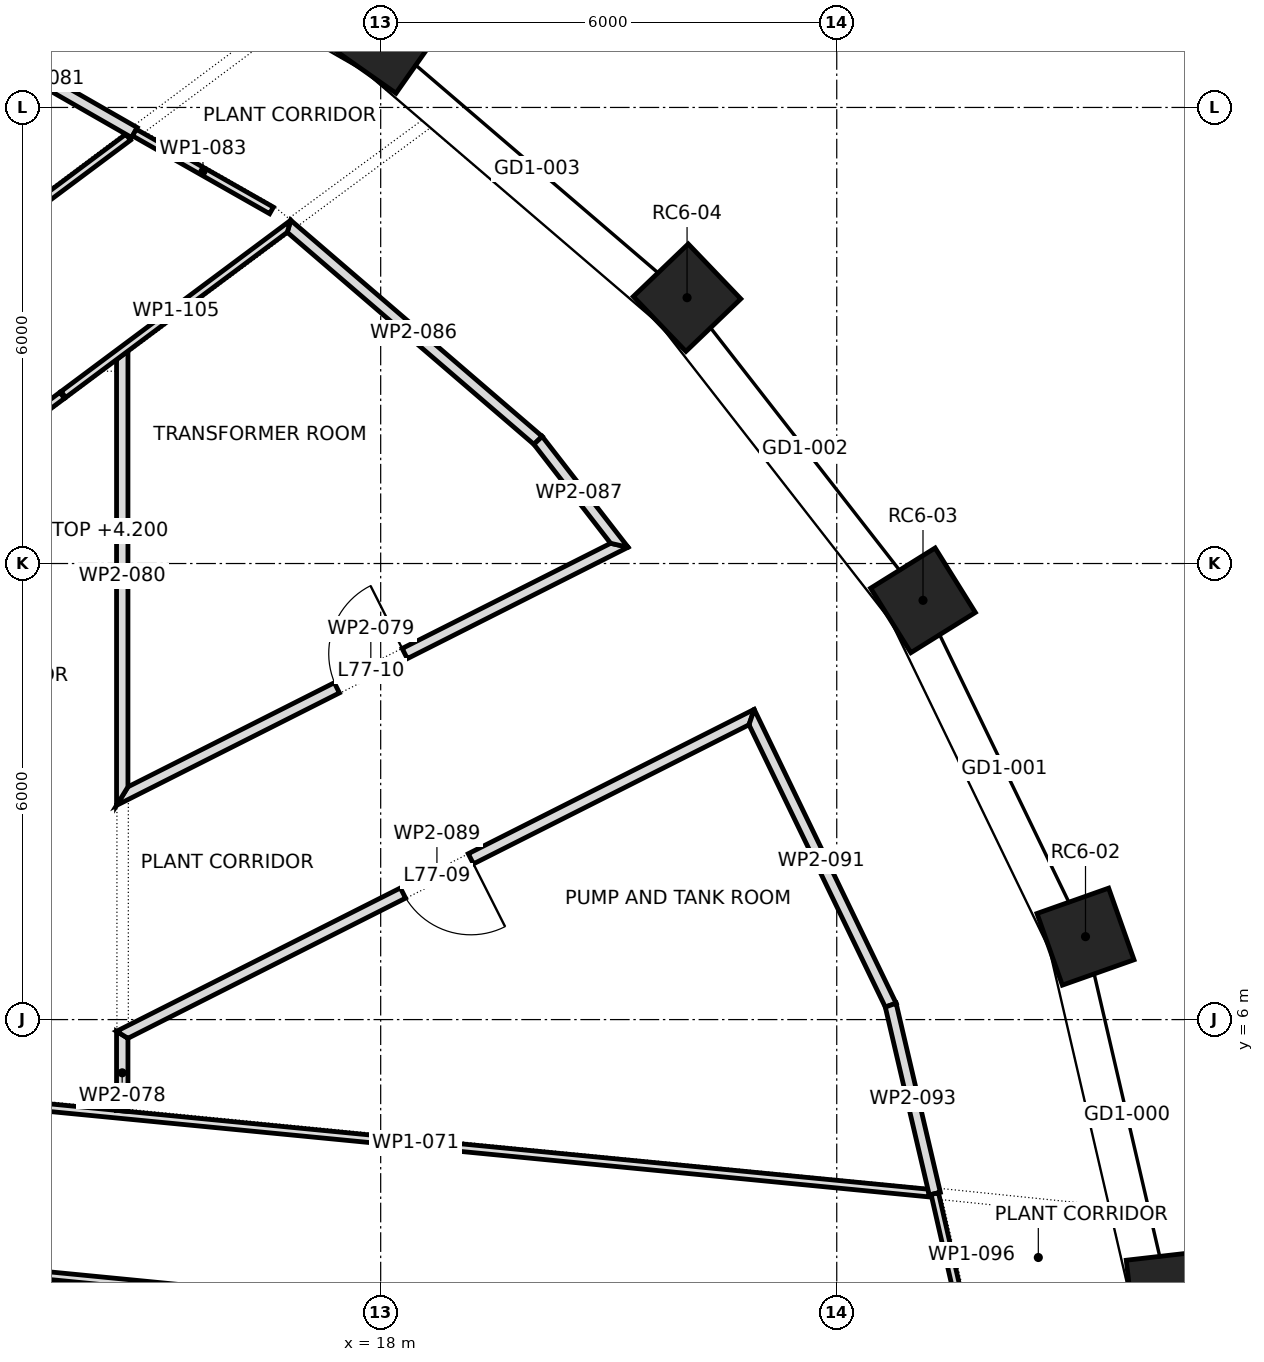
"""IFC4 building model, lengths in metres.
Left out: names, types, materials, properties, quantities, classifications, styles, units other than length and angle.
Written with IfcOpenShell. Run it as: python <this file> out.ifc"""

import sys

from ifc_helpers import new_model, si_unit, direction, frame, frame_2d, origin, origin_2d, place, context, subcontext, project, spatial, polyline, rectangle, outline, extrude, element, fill, save


model = new_model("IFC4")
c1 = context("Model", 3, precision=1e-05, world=origin(), true_north=direction((0.0, 1.0)))
c2 = subcontext(c1, "Body", "Model", "MODEL_VIEW")
j1 = project(units=[si_unit("LENGTHUNIT", "METRE"), si_unit("PLANEANGLEUNIT", "RADIAN")], contexts=[c1])
p1 = place(None, origin())
s1 = spatial("IfcSite", under=j1, at=p1, CompositionType="ELEMENT")
p2 = place(p1, origin())
s2 = spatial("IfcBuilding", under=s1, at=p2, CompositionType="ELEMENT")
p3 = place(p2, frame((0.0, 0.0, 328.3)))
s3 = spatial("IfcBuildingStorey", under=s2, at=p3, CompositionType="ELEMENT", Elevation=328.3)
for number, where, z_axis, x_axis in (
    (1, (28.363, 2.394, 0.0), (0.0, 0.0, 1.0), (-0.114, 0.993, 0.0)),
    (2, (27.273, 7.091, 0.0), (0.0, 0.0, 1.0), (-0.334, 0.943, 0.0)),
    (3, (25.135, 11.516, 0.0), (0.0, 0.0, 1.0), (-0.529, 0.849, 0.0)),
    (4, (22.031, 15.497, 0.0), (0.0, 0.0, 1.0), (-0.692, 0.722, 0.0)),
    (5, (18.08, 18.884, 0.0), (0.0, 0.0, 1.0), (-0.818, 0.575, 0.0)),
):
    element("IfcColumn", number, at=place(p3, frame(where, z_axis=z_axis, x_axis=x_axis)), inside=s3, PredefinedType="COLUMN", context=c2, shape_type="SweptSolid", body=[
        extrude(rectangle(XDim=1.0, YDim=1.0, at=origin_2d()), origin(), (0.0, 0.0, 1.0), 5.0),
    ])
p4 = place(p3, frame((7.82, 12.49, 0.0), z_axis=(0.0, 0.0, 1.0), x_axis=(0.801408213351, 0.598117777343, 0.0)))
e6 = element("IfcWall", 6, at=p4, inside=s3, PredefinedType="PARTITIONING", context=c2, shape_type="SweptSolid", body=[
    extrude(outline(polyline([(0.0, 0.05), (0.0, 0.05), (0.101, -0.05), (1.792, -0.05), (3.483, -0.05), (5.175, -0.05), (6.866, -0.05), (8.558, -0.05), (8.558, 0.05), (6.846, 0.05), (5.135, 0.05), (3.423, 0.05), (1.712, 0.05), (0.0, 0.05)])), origin(), (0.0, 0.0, 1.0), 4.65),
])
p5 = place(p3, frame((11.7, 2.82, 0.0), z_axis=(0.0, 0.0, 1.0), x_axis=(0.995286657009, -0.096976648632, 0.0)))
e7 = element("IfcWall", 7, at=p5, inside=s3, PredefinedType="PARTITIONING", context=c2, shape_type="SweptSolid", body=[
    extrude(outline(polyline([(0.0, -0.05), (1.497, -0.05), (2.993, -0.05), (2.994, -0.05), (2.994, -0.05), (4.518, -0.05), (6.041, -0.05), (7.565, -0.05), (9.088, -0.05), (9.088, 0.05), (7.271, 0.05), (5.453, 0.05), (3.635, 0.05), (1.818, 0.05), (0.0, 0.05), (0.0, -0.05)])), origin(), (0.0, 0.0, 1.0), 4.65),
])
p6 = place(p3, frame((11.7, 5.03, 0.0), z_axis=(0.0, 0.0, 1.0), x_axis=(0.995314737099, -0.096688024663, 0.0)))
e8 = element("IfcWall", 8, at=p6, inside=s3, PredefinedType="PARTITIONING", context=c2, shape_type="SweptSolid", body=[
    extrude(outline(polyline([(13.617, -0.05), (13.617, -0.048), (13.607, -0.016), (13.583, -0.024), (13.558, 0.05), (11.772, 0.05), (9.986, 0.05), (8.2, 0.05), (6.414, 0.05), (4.628, 0.05), (2.843, 0.05), (2.833, 0.049), (2.833, 0.05), (1.417, 0.05), (0.0, 0.05), (0.0, -0.05), (1.945, -0.05), (3.891, -0.05), (5.836, -0.05), (7.781, -0.05), (9.727, -0.05), (11.672, -0.05), (13.617, -0.05)])), origin(), (0.0, 0.0, 1.0), 4.65),
])
p7 = place(p3, frame((14.6, 5.846, 0.0), z_axis=(0.0, 0.0, 1.0), x_axis=(0.0, -1.0, 0.0)))
e9 = element("IfcWall", 9, at=p7, inside=s3, PredefinedType="PARTITIONING", context=c2, shape_type="SweptSolid", body=[
    extrude(outline(polyline([(0.0, -0.075), (1.04, -0.075), (1.055, 0.072), (1.055, 0.075), (0.092, 0.075), (0.092, 0.075), (0.092, 0.075), (0.046, 0.0), (0.0, -0.075)])), origin(), (0.0, 0.0, 1.0), 4.65),
])
p8 = place(p3, frame((14.491, 8.885, 0.0), z_axis=(0.0, 0.0, 1.0), x_axis=(0.892775886328, 0.450501073018, 0.0)))
e10 = element("IfcWall", 10, at=p8, inside=s3, PredefinedType="PARTITIONING", context=c2, shape_type="SweptSolid", body=[
    extrude(outline(polyline([(0.0, -0.075), (1.885, -0.075), (3.769, -0.075), (5.654, -0.075), (7.538, -0.075), (7.356, 0.075), (5.578, 0.075), (3.8, 0.075), (2.022, 0.075), (0.244, 0.075), (0.0, -0.075), (0.0, -0.075)])), origin(), (0.0, 0.0, 1.0), 4.65),
])
p9 = place(p8, frame((3.285, 0.0, 0.0)))
e11 = element("IfcOpeningElement", 11, at=p9, cuts=e10, PredefinedType="OPENING", context=c2, shape_type="SweptSolid", body=[
    extrude(rectangle(XDim=1.0, YDim=2.1, at=frame_2d((0.5, 1.05))), frame((0.0, 0.087, 0.0), z_axis=(0.0, -1.0, 0.0), x_axis=(1.0, 0.0, 0.0)), (0.0, 0.0, 1.0), 0.174),
])
p10 = place(p3, frame((14.6, 14.794, 0.0), z_axis=(0.0, 0.0, 1.0), x_axis=(0.0, -1.0, 0.0)))
e12 = element("IfcWall", 12, at=p10, inside=s3, PredefinedType="PARTITIONING", context=c2, shape_type="SweptSolid", body=[
    extrude(outline(polyline([(0.111, -0.075), (2.066, -0.075), (4.021, -0.075), (5.976, -0.075), (5.854, 0.0), (5.732, 0.075), (5.732, 0.075), (5.732, 0.075), (3.822, 0.075), (1.911, 0.075), (0.0, 0.075), (0.0, 0.074), (0.111, -0.075)])), origin(), (0.0, 0.0, 1.0), 4.65),
])
p11 = place(p3, frame((14.76, 17.67, 0.0), z_axis=(0.0, 0.0, 1.0), x_axis=(-0.867555136947, 0.497341014151, 0.0)))
e13 = element("IfcWall", 13, at=p11, inside=s3, PredefinedType="PARTITIONING", context=c2, shape_type="SweptSolid", body=[
    extrude(outline(polyline([(0.0, -0.075), (1.421, -0.075), (2.842, -0.075), (2.829, 0.075), (1.414, 0.075), (0.0, 0.075), (0.0, -0.075)])), origin(), (0.0, 0.0, 1.0), 4.65),
])
p12 = place(p3, frame((16.563, 16.645, 0.0), z_axis=(0.0, 0.0, 1.0), x_axis=(-0.86946460017, 0.493995252053, 0.0)))
e14 = element("IfcWall", 14, at=p12, inside=s3, PredefinedType="PARTITIONING", context=c2, shape_type="SweptSolid", body=[
    extrude(rectangle(XDim=2.074, YDim=0.1, at=frame_2d((1.037, 0.0))), origin(), (0.0, 0.0, 1.0), 4.65),
])
p13 = place(p3, frame((20.076, 13.615, 0.0), z_axis=(0.0, 0.0, 1.0), x_axis=(-0.758268185536, 0.651942757306, 0.0)))
e15 = element("IfcWall", 15, at=p13, inside=s3, PredefinedType="PARTITIONING", context=c2, shape_type="SweptSolid", body=[
    extrude(outline(polyline([(0.0, -0.075), (1.454, -0.075), (2.908, -0.075), (4.363, -0.075), (4.294, 0.075), (2.867, 0.075), (1.441, 0.075), (0.015, 0.075), (0.0, -0.075)])), origin(), (0.0, 0.0, 1.0), 4.65),
])
p14 = place(p3, frame((21.196, 12.168, 0.0), z_axis=(0.0, 0.0, 1.0), x_axis=(-0.612776292464, 0.790256423823, 0.0)))
e16 = element("IfcWall", 16, at=p14, inside=s3, PredefinedType="PARTITIONING", context=c2, shape_type="SweptSolid", body=[
    extrude(outline(polyline([(0.0, -0.075), (1.845, -0.075), (1.83, 0.075), (0.182, 0.075), (0.0, -0.075), (0.0, -0.075)])), origin(), (0.0, 0.0, 1.0), 4.65),
])
p15 = place(p3, frame((22.948, 10.014, 0.0), z_axis=(0.0, 0.0, 1.0), x_axis=(-0.892695521655, -0.450660299579, 0.0)))
e17 = element("IfcWall", 17, at=p15, inside=s3, PredefinedType="PARTITIONING", context=c2, shape_type="SweptSolid", body=[
    extrude(outline(polyline([(9.397, -0.075), (9.397, -0.075), (9.305, 0.075), (7.475, 0.075), (5.644, 0.075), (3.814, 0.075), (1.983, 0.075), (0.152, 0.075), (0.0, -0.075), (0.0, -0.075), (1.879, -0.075), (3.759, -0.075), (5.638, -0.075), (7.518, -0.075), (9.397, -0.075)])), origin(), (0.0, 0.0, 1.0), 4.65),
])
p16 = place(p15, frame((4.214, 0.0, 0.0)))
e18 = element("IfcOpeningElement", 18, at=p16, cuts=e17, PredefinedType="OPENING", context=c2, shape_type="SweptSolid", body=[
    extrude(rectangle(XDim=1.0, YDim=2.1, at=frame_2d((0.5, 1.05))), frame((0.0, 0.087, 0.0), z_axis=(0.0, -1.0, 0.0), x_axis=(1.0, 0.0, 0.0)), (0.0, 0.0, 1.0), 0.174),
])
p17 = place(p3, frame((24.714, 6.183, 0.0), z_axis=(0.0, 0.0, 1.0), x_axis=(-0.434865155108, 0.900495584038, 0.0)))
e19 = element("IfcWall", 19, at=p17, inside=s3, PredefinedType="PARTITIONING", context=c2, shape_type="SweptSolid", body=[
    extrude(outline(polyline([(0.0, -0.075), (1.431, -0.075), (2.862, -0.075), (4.293, -0.075), (4.14, 0.075), (2.766, 0.075), (1.391, 0.075), (0.017, 0.075), (0.0, -0.074), (0.0, -0.075)])), origin(), (0.0, 0.0, 1.0), 4.65),
])
p18 = place(p3, frame((25.29, 3.71, 0.0), z_axis=(0.0, 0.0, 1.0), x_axis=(-0.227782317725, 0.97371208051, 0.0)))
e20 = element("IfcWall", 20, at=p18, inside=s3, PredefinedType="PARTITIONING", context=c2, shape_type="SweptSolid", body=[
    extrude(outline(polyline([(2.555, -0.075), (2.555, -0.074), (2.539, 0.075), (1.269, 0.075), (0.0, 0.075), (0.0, -0.075), (1.278, -0.075), (2.555, -0.075)])), origin(), (0.0, 0.0, 1.0), 4.65),
])
p19 = place(p3, frame((25.661, 2.084, 0.0), z_axis=(0.0, 0.0, 1.0), x_axis=(-0.222709501709, 0.974884853636, 0.0)))
e21 = element("IfcWall", 21, at=p19, inside=s3, PredefinedType="PARTITIONING", context=c2, shape_type="SweptSolid", body=[
    extrude(outline(polyline([(1.667, 0.05), (0.011, 0.05), (0.0, -0.05), (1.667, -0.05), (1.667, 0.05)])), origin(), (0.0, 0.0, 1.0), 4.65),
])
p20 = place(p3, frame((12.389, 13.153, 0.0), z_axis=(0.0, 0.0, 1.0), x_axis=(0.801690929697, 0.597738783451, 0.0)))
e22 = element("IfcWall", 22, at=p20, inside=s3, PredefinedType="PARTITIONING", context=c2, shape_type="SweptSolid", body=[
    extrude(outline(polyline([(0.0, 0.05), (0.0, -0.05), (1.781, -0.05), (1.781, 0.05), (0.0, 0.05)])), origin(), (0.0, 0.0, 1.0), 4.2),
])
p21 = place(p3, frame((13.817, 14.218, 0.0), z_axis=(0.0, 0.0, 1.0), x_axis=(0.801741359851, 0.597671140264, 0.0)))
e23 = element("IfcWall", 23, at=p21, inside=s3, PredefinedType="PARTITIONING", context=c2, shape_type="SweptSolid", body=[
    extrude(outline(polyline([(0.0, -0.05), (1.823, -0.05), (3.647, -0.05), (3.778, 0.05), (3.778, 0.05), (1.889, 0.05), (0.0, 0.05), (0.0, -0.05)])), origin(), (0.0, 0.0, 1.0), 4.65),
])
p22 = place(p16, origin())
e24 = element("IfcDoor", 24, at=p22, inside=s3, OperationType="SINGLE_SWING_RIGHT", PredefinedType="DOOR", context=c2, shape_type="SweptSolid", body=[
    extrude(rectangle(XDim=1.0, YDim=2.1, at=frame_2d((0.5, 1.05))), frame((0.0, 0.025, 0.0), z_axis=(0.0, -1.0, 0.0), x_axis=(1.0, 0.0, 0.0)), (0.0, 0.0, 1.0), 0.05),
])
fill(e18, e24)
p23 = place(p9, origin())
e25 = element("IfcDoor", 25, at=p23, inside=s3, OperationType="SINGLE_SWING_LEFT", PredefinedType="DOOR", context=c2, shape_type="SweptSolid", body=[
    extrude(rectangle(XDim=1.0, YDim=2.1, at=frame_2d((0.5, 1.05))), frame((0.0, 0.025, 0.0), z_axis=(0.0, -1.0, 0.0), x_axis=(1.0, 0.0, 0.0)), (0.0, 0.0, 1.0), 0.05),
])
fill(e11, e25)
save(model, sys.argv[1])
